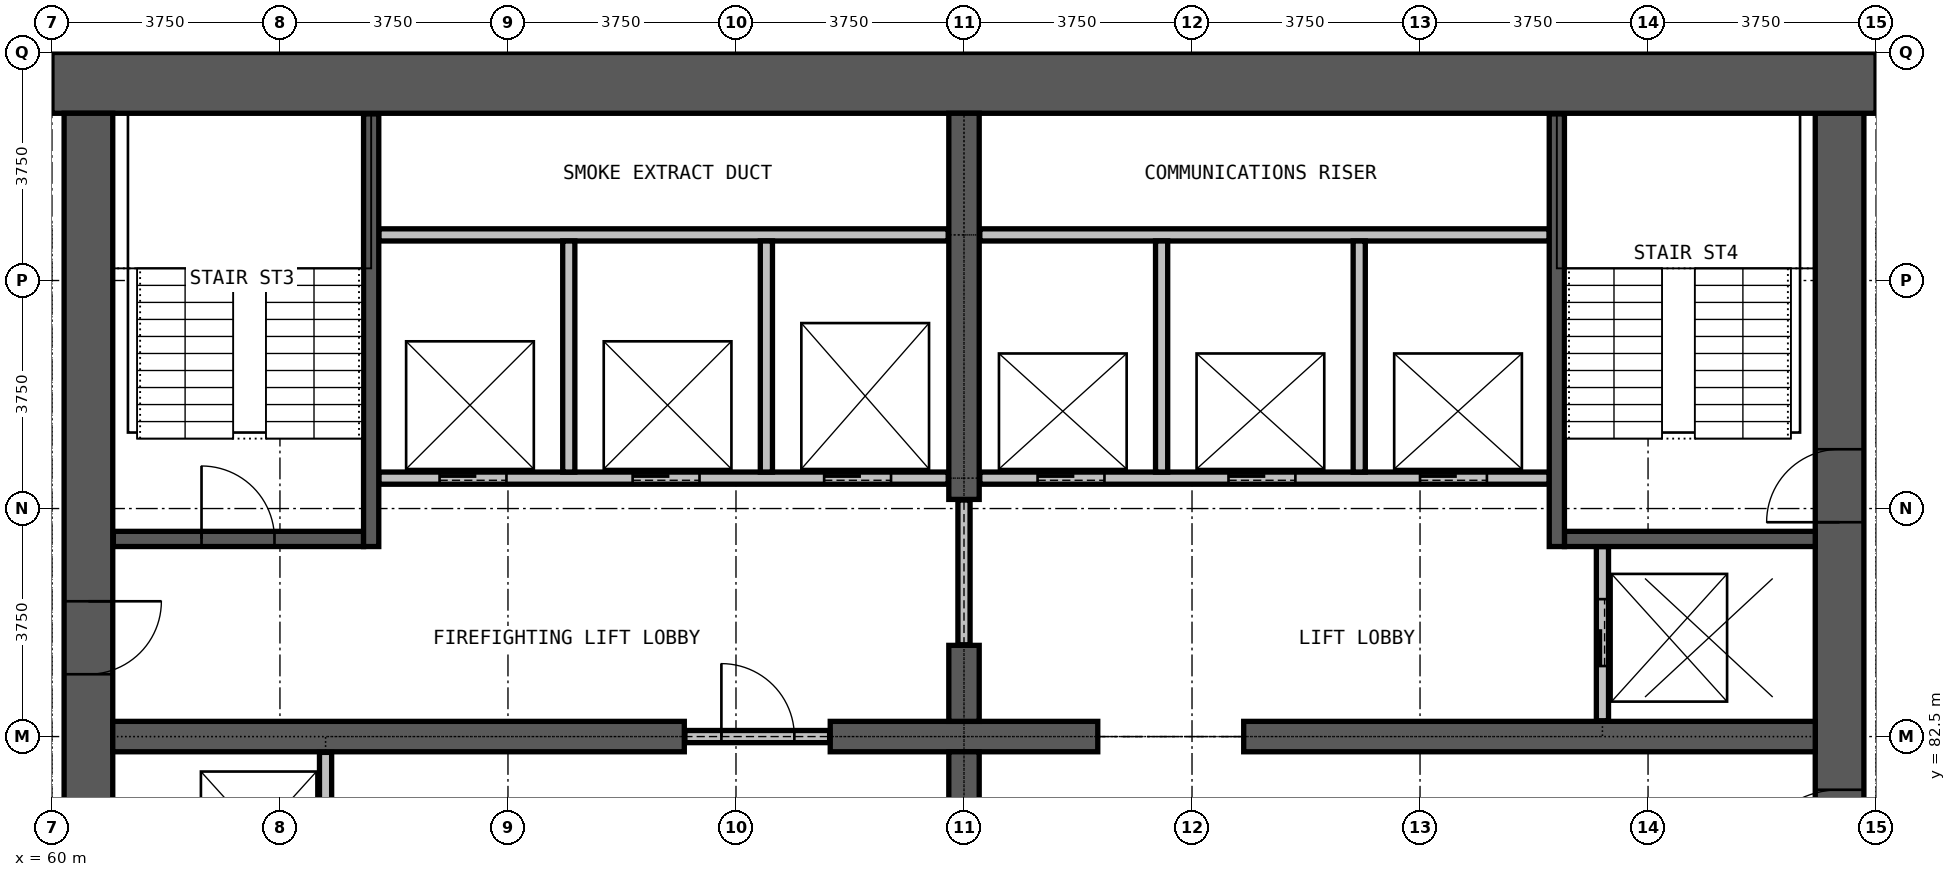
"""IFC4 building model, lengths in metres.
Left out: names, types, materials, properties, quantities, classifications, styles, units other than length and angle.
Written with IfcOpenShell. Run it as: python <this file> out.ifc"""

import sys

from ifc_helpers import new_model, si_unit, direction, frame, frame_2d, origin, place, context, subcontext, project, spatial, rectangle, extrude, element, fill, save


model = new_model("IFC4")
c1 = context("Model", 3, precision=1e-05, world=origin(), true_north=direction((0.0, 1.0)))
c2 = subcontext(c1, "Body", "Model", "MODEL_VIEW")
j1 = project(units=[si_unit("LENGTHUNIT", "METRE"), si_unit("PLANEANGLEUNIT", "RADIAN")], contexts=[c1])
p1 = place(None, origin())
s1 = spatial("IfcSite", under=j1, at=p1, CompositionType="ELEMENT")
p2 = place(p1, origin())
s2 = spatial("IfcBuilding", under=s1, at=p2, CompositionType="ELEMENT")
p3 = place(p2, frame((0.0, 0.0, 151.3)))
s3 = spatial("IfcBuildingStorey", under=s2, at=p3, CompositionType="ELEMENT", Elevation=151.3)
p4 = place(p3, frame((89.4, 72.25, 0.0), z_axis=(0.0, 0.0, 1.0), x_axis=(0.0, 1.0, 0.0)))
e1 = element("IfcWall", 1, at=p4, inside=s3, PredefinedType="SHEAR", context=c2, shape_type="SweptSolid", body=[
    extrude(rectangle(XDim=20.5, YDim=0.8, at=frame_2d((10.25, 0.0))), origin(), (0.0, 0.0, 1.0), 3.6),
])
p5 = place(p4, frame((0.275, 0.0, 0.0)))
e2 = element("IfcOpeningElement", 2, at=p5, cuts=e1, PredefinedType="OPENING", context=c2, shape_type="SweptSolid", body=[
    extrude(rectangle(XDim=1.2, YDim=2.2, at=frame_2d((0.6, 1.1))), frame((0.0, 0.41, 0.0), z_axis=(0.0, -1.0, 0.0), x_axis=(1.0, 0.0, 0.0)), (0.0, 0.0, 1.0), 0.82),
])
p6 = place(p4, frame((13.775, 0.0, 0.0)))
e3 = element("IfcOpeningElement", 3, at=p6, cuts=e1, PredefinedType="OPENING", context=c2, shape_type="SweptSolid", body=[
    extrude(rectangle(XDim=1.2, YDim=2.2, at=frame_2d((0.6, 1.1))), frame((0.0, 0.41, 0.0), z_axis=(0.0, -1.0, 0.0), x_axis=(1.0, 0.0, 0.0)), (0.0, 0.0, 1.0), 0.82),
])
p7 = place(p4, frame((7.875, 0.0, 0.0)))
e4 = element("IfcOpeningElement", 4, at=p7, cuts=e1, PredefinedType="OPENING", context=c2, shape_type="SweptSolid", body=[
    extrude(rectangle(XDim=1.5, YDim=2.2, at=frame_2d((0.75, 1.1))), frame((0.0, 0.41, 0.0), z_axis=(0.0, -1.0, 0.0), x_axis=(1.0, 0.0, 0.0)), (0.0, 0.0, 1.0), 0.82),
])
p8 = place(p3, frame((90.0, 93.25, 0.0), z_axis=(0.0, 0.0, 1.0), x_axis=(-1.0, 0.0, 0.0)))
e5 = element("IfcWall", 5, at=p8, inside=s3, PredefinedType="SHEAR", context=c2, shape_type="SweptSolid", body=[
    extrude(rectangle(XDim=30.0, YDim=1.0, at=frame_2d((15.0, 0.0))), origin(), (0.0, 0.0, 1.0), 3.6),
])
p9 = place(p3, frame((60.6, 92.75, 0.0), z_axis=(0.0, 0.0, 1.0), x_axis=(0.0, -1.0, 0.0)))
e6 = element("IfcWall", 6, at=p9, inside=s3, PredefinedType="SHEAR", context=c2, shape_type="SweptSolid", body=[
    extrude(rectangle(XDim=20.5, YDim=0.8, at=frame_2d((10.25, 0.0))), origin(), (0.0, 0.0, 1.0), 3.6),
])
p10 = place(p9, frame((19.025, 0.0, 0.0)))
e7 = element("IfcOpeningElement", 7, at=p10, cuts=e6, PredefinedType="OPENING", context=c2, shape_type="SweptSolid", body=[
    extrude(rectangle(XDim=1.2, YDim=2.2, at=frame_2d((0.6, 1.1))), frame((0.0, 0.41, 0.0), z_axis=(0.0, -1.0, 0.0), x_axis=(1.0, 0.0, 0.0)), (0.0, 0.0, 1.0), 0.82),
])
p11 = place(p9, frame((8.025, 0.0, 0.0)))
e8 = element("IfcOpeningElement", 8, at=p11, cuts=e6, PredefinedType="OPENING", context=c2, shape_type="SweptSolid", body=[
    extrude(rectangle(XDim=1.2, YDim=2.2, at=frame_2d((0.6, 1.1))), frame((0.0, 0.41, 0.0), z_axis=(0.0, -1.0, 0.0), x_axis=(1.0, 0.0, 0.0)), (0.0, 0.0, 1.0), 0.82),
])
p12 = place(p3, frame((61.0, 82.5, 0.0), z_axis=(0.0, 0.0, 1.0), x_axis=(1.0, 0.0, 0.0)))
e9 = element("IfcWall", 9, at=p12, inside=s3, PredefinedType="SHEAR", context=c2, shape_type="SweptSolid", body=[
    extrude(rectangle(XDim=9.4, YDim=0.5, at=frame_2d((4.7, 0.0))), origin(), (0.0, 0.0, 1.0), 3.6),
])
p13 = place(p3, frame((72.8, 82.5, 0.0), z_axis=(0.0, 0.0, 1.0), x_axis=(1.0, 0.0, 0.0)))
e10 = element("IfcWall", 10, at=p13, inside=s3, PredefinedType="SHEAR", context=c2, shape_type="SweptSolid", body=[
    extrude(rectangle(XDim=4.4, YDim=0.5, at=frame_2d((2.2, 0.0))), origin(), (0.0, 0.0, 1.0), 3.6),
])
p14 = place(p3, frame((79.6, 82.5, 0.0), z_axis=(0.0, 0.0, 1.0), x_axis=(1.0, 0.0, 0.0)))
e11 = element("IfcWall", 11, at=p14, inside=s3, PredefinedType="SHEAR", context=c2, shape_type="SweptSolid", body=[
    extrude(rectangle(XDim=9.4, YDim=0.5, at=frame_2d((4.7, 0.0))), origin(), (0.0, 0.0, 1.0), 3.6),
])
for number, where, z_axis, x_axis in (
    (12, (75.0, 81.0, 0.0), (0.0, 0.0, 1.0), (0.0, 1.0, 0.0)),
    (13, (75.0, 82.75, 0.0), (0.0, 0.0, 1.0), (0.0, 1.0, 0.0)),
):
    element("IfcWall", number, at=place(p3, frame(where, z_axis=z_axis, x_axis=x_axis)), inside=s3, PredefinedType="SHEAR", context=c2, shape_type="SweptSolid", body=[
        extrude(rectangle(XDim=1.25, YDim=0.5, at=frame_2d((0.625, 0.0))), origin(), (0.0, 0.0, 1.0), 3.6),
    ])
p15 = place(p3, frame((75.0, 86.4, 0.0), z_axis=(0.0, 0.0, 1.0), x_axis=(0.0, 1.0, 0.0)))
e14 = element("IfcWall", 14, at=p15, inside=s3, PredefinedType="SHEAR", context=c2, shape_type="SweptSolid", body=[
    extrude(rectangle(XDim=6.35, YDim=0.5, at=frame_2d((3.175, 0.0))), origin(), (0.0, 0.0, 1.0), 3.6),
])
p16 = place(p3, frame((70.41, 82.5, 0.0), z_axis=(0.0, 0.0, 1.0), x_axis=(1.0, 0.0, 0.0)))
e15 = element("IfcWall", 15, at=p16, inside=s3, PredefinedType="PARTITIONING", context=c2, shape_type="SweptSolid", body=[
    extrude(rectangle(XDim=2.38, YDim=0.2, at=frame_2d((1.19, 0.0))), origin(), (0.0, 0.0, 1.0), 2.4),
])
p17 = place(p16, frame((0.6, 0.0, 0.0)))
e16 = element("IfcOpeningElement", 16, at=p17, cuts=e15, PredefinedType="OPENING", context=c2, shape_type="SweptSolid", body=[
    extrude(rectangle(XDim=1.2, YDim=2.2, at=frame_2d((0.6, 1.1))), frame((0.0, 0.11, 0.0), z_axis=(0.0, -1.0, 0.0), x_axis=(1.0, 0.0, 0.0)), (0.0, 0.0, 1.0), 0.22),
])
p18 = place(p3, frame((75.0, 84.01, 0.0), z_axis=(0.0, 0.0, 1.0), x_axis=(0.0, 1.0, 0.0)))
e17 = element("IfcWall", 17, at=p18, inside=s3, PredefinedType="PARTITIONING", context=c2, shape_type="SweptSolid", body=[
    extrude(rectangle(XDim=2.38, YDim=0.2, at=frame_2d((1.19, 0.0))), origin(), (0.0, 0.0, 1.0), 2.4),
])
p19 = place(p3, frame((65.375, 86.75, 0.0), z_axis=(0.0, 0.0, 1.0), x_axis=(1.0, 0.0, 0.0)))
e18 = element("IfcWall", 18, at=p19, inside=s3, PredefinedType="PARTITIONING", context=c2, shape_type="SweptSolid", body=[
    extrude(rectangle(XDim=9.365, YDim=0.2, at=frame_2d((4.683, 0.0))), origin(), (0.0, 0.0, 1.0), 3.3),
])
p20 = place(p19, frame((1.0, 0.0, 0.0)))
e19 = element("IfcOpeningElement", 19, at=p20, cuts=e18, PredefinedType="OPENING", context=c2, shape_type="SweptSolid", body=[
    extrude(rectangle(XDim=1.1, YDim=2.2, at=frame_2d((0.55, 1.1))), frame((0.0, 0.11, 0.0), z_axis=(0.0, -1.0, 0.0), x_axis=(1.0, 0.0, 0.0)), (0.0, 0.0, 1.0), 0.22),
])
p21 = place(p19, frame((4.175, 0.0, 0.0)))
e20 = element("IfcOpeningElement", 20, at=p21, cuts=e18, PredefinedType="OPENING", context=c2, shape_type="SweptSolid", body=[
    extrude(rectangle(XDim=1.1, YDim=2.2, at=frame_2d((0.55, 1.1))), frame((0.0, 0.11, 0.0), z_axis=(0.0, -1.0, 0.0), x_axis=(1.0, 0.0, 0.0)), (0.0, 0.0, 1.0), 0.22),
])
p22 = place(p19, frame((7.325, 0.0, 0.0)))
e21 = element("IfcOpeningElement", 21, at=p22, cuts=e18, PredefinedType="OPENING", context=c2, shape_type="SweptSolid", body=[
    extrude(rectangle(XDim=1.1, YDim=2.2, at=frame_2d((0.55, 1.1))), frame((0.0, 0.11, 0.0), z_axis=(0.0, -1.0, 0.0), x_axis=(1.0, 0.0, 0.0)), (0.0, 0.0, 1.0), 0.22),
])
p23 = place(p3, frame((75.26, 86.75, 0.0), z_axis=(0.0, 0.0, 1.0), x_axis=(1.0, 0.0, 0.0)))
e22 = element("IfcWall", 22, at=p23, inside=s3, PredefinedType="PARTITIONING", context=c2, shape_type="SweptSolid", body=[
    extrude(rectangle(XDim=9.365, YDim=0.2, at=frame_2d((4.683, 0.0))), origin(), (0.0, 0.0, 1.0), 3.3),
])
p24 = place(p23, frame((0.95, 0.0, 0.0)))
e23 = element("IfcOpeningElement", 23, at=p24, cuts=e22, PredefinedType="OPENING", context=c2, shape_type="SweptSolid", body=[
    extrude(rectangle(XDim=1.1, YDim=2.2, at=frame_2d((0.55, 1.1))), frame((0.0, 0.11, 0.0), z_axis=(0.0, -1.0, 0.0), x_axis=(1.0, 0.0, 0.0)), (0.0, 0.0, 1.0), 0.22),
])
p25 = place(p23, frame((4.09, 0.0, 0.0)))
e24 = element("IfcOpeningElement", 24, at=p25, cuts=e22, PredefinedType="OPENING", context=c2, shape_type="SweptSolid", body=[
    extrude(rectangle(XDim=1.1, YDim=2.2, at=frame_2d((0.55, 1.1))), frame((0.0, 0.11, 0.0), z_axis=(0.0, -1.0, 0.0), x_axis=(1.0, 0.0, 0.0)), (0.0, 0.0, 1.0), 0.22),
])
p26 = place(p23, frame((7.24, 0.0, 0.0)))
e25 = element("IfcOpeningElement", 25, at=p26, cuts=e22, PredefinedType="OPENING", context=c2, shape_type="SweptSolid", body=[
    extrude(rectangle(XDim=1.1, YDim=2.2, at=frame_2d((0.55, 1.1))), frame((0.0, 0.11, 0.0), z_axis=(0.0, -1.0, 0.0), x_axis=(1.0, 0.0, 0.0)), (0.0, 0.0, 1.0), 0.22),
])
for number, where, z_axis, x_axis in (
    (26, (65.375, 90.75, 0.0), (0.0, 0.0, 1.0), (1.0, 0.0, 0.0)),
    (27, (75.26, 90.75, 0.0), (0.0, 0.0, 1.0), (1.0, 0.0, 0.0)),
):
    element("IfcWall", number, at=place(p3, frame(where, z_axis=z_axis, x_axis=x_axis)), inside=s3, PredefinedType="PARTITIONING", context=c2, shape_type="SweptSolid", body=[
        extrude(rectangle(XDim=9.365, YDim=0.2, at=frame_2d((4.683, 0.0))), origin(), (0.0, 0.0, 1.0), 3.3),
    ])
p27 = place(p3, frame((64.5, 79.375, 0.0), z_axis=(0.0, 0.0, 1.0), x_axis=(0.0, 1.0, 0.0)))
e28 = element("IfcWall", 28, at=p27, inside=s3, PredefinedType="PARTITIONING", context=c2, shape_type="SweptSolid", body=[
    extrude(rectangle(XDim=2.865, YDim=0.2, at=frame_2d((1.433, 0.0))), origin(), (0.0, 0.0, 1.0), 3.3),
])
for number, where, z_axis, x_axis in (
    (29, (68.5, 86.85, 0.0), (0.0, 0.0, 1.0), (0.0, 1.0, 0.0)),
    (30, (71.75, 86.85, 0.0), (0.0, 0.0, 1.0), (0.0, 1.0, 0.0)),
    (31, (78.25, 86.85, 0.0), (0.0, 0.0, 1.0), (0.0, 1.0, 0.0)),
    (32, (81.5, 86.85, 0.0), (0.0, 0.0, 1.0), (0.0, 1.0, 0.0)),
):
    element("IfcWall", number, at=place(p3, frame(where, z_axis=z_axis, x_axis=x_axis)), inside=s3, PredefinedType="PARTITIONING", context=c2, shape_type="SweptSolid", body=[
        extrude(rectangle(XDim=3.8, YDim=0.2, at=frame_2d((1.9, 0.0))), origin(), (0.0, 0.0, 1.0), 3.3),
    ])
p28 = place(p3, frame((85.5, 82.76, 0.0), z_axis=(0.0, 0.0, 1.0), x_axis=(0.0, 1.0, 0.0)))
e33 = element("IfcWall", 33, at=p28, inside=s3, PredefinedType="PARTITIONING", context=c2, shape_type="SweptSolid", body=[
    extrude(rectangle(XDim=2.865, YDim=0.2, at=frame_2d((1.433, 0.0))), origin(), (0.0, 0.0, 1.0), 3.3),
])
p29 = place(p28, frame((0.9, 0.0, 0.0)))
e34 = element("IfcOpeningElement", 34, at=p29, cuts=e33, PredefinedType="OPENING", context=c2, shape_type="SweptSolid", body=[
    extrude(rectangle(XDim=1.1, YDim=2.2, at=frame_2d((0.55, 1.1))), frame((0.0, 0.11, 0.0), z_axis=(0.0, -1.0, 0.0), x_axis=(1.0, 0.0, 0.0)), (0.0, 0.0, 1.0), 0.22),
])
p30 = place(p3, frame((61.01, 85.75, 0.0), z_axis=(0.0, 0.0, 1.0), x_axis=(1.0, 0.0, 0.0)))
e35 = element("IfcWall", 35, at=p30, inside=s3, PredefinedType="PARTITIONING", context=c2, shape_type="SweptSolid", body=[
    extrude(rectangle(XDim=4.115, YDim=0.25, at=frame_2d((2.058, 0.0))), origin(), (0.0, 0.0, 1.0), 3.3),
])
p31 = place(p30, frame((1.45, 0.0, 0.0)))
e36 = element("IfcOpeningElement", 36, at=p31, cuts=e35, PredefinedType="OPENING", context=c2, shape_type="SweptSolid", body=[
    extrude(rectangle(XDim=1.2, YDim=2.2, at=frame_2d((0.6, 1.1))), frame((0.0, 0.135, 0.0), z_axis=(0.0, -1.0, 0.0), x_axis=(1.0, 0.0, 0.0)), (0.0, 0.0, 1.0), 0.27),
])
p32 = place(p3, frame((84.875, 85.75, 0.0), z_axis=(0.0, 0.0, 1.0), x_axis=(1.0, 0.0, 0.0)))
e37 = element("IfcWall", 37, at=p32, inside=s3, PredefinedType="PARTITIONING", context=c2, shape_type="SweptSolid", body=[
    extrude(rectangle(XDim=4.125, YDim=0.25, at=frame_2d((2.062, 0.0))), origin(), (0.0, 0.0, 1.0), 3.3),
])
for number, where, z_axis, x_axis in (
    (38, (65.25, 85.625, 0.0), (0.0, 0.0, 1.0), (0.0, 1.0, 0.0)),
    (39, (84.75, 85.625, 0.0), (0.0, 0.0, 1.0), (0.0, 1.0, 0.0)),
):
    element("IfcWall", number, at=place(p3, frame(where, z_axis=z_axis, x_axis=x_axis)), inside=s3, PredefinedType="PARTITIONING", context=c2, shape_type="SweptSolid", body=[
        extrude(rectangle(XDim=7.115, YDim=0.25, at=frame_2d((3.558, 0.0))), origin(), (0.0, 0.0, 1.0), 3.3),
    ])
p33 = place(p24, origin())
e40 = element("IfcDoor", 40, at=p33, inside=s3, OperationType="DOUBLE_DOOR_SLIDING", PredefinedType="DOOR", context=c2, shape_type="SweptSolid", body=[
    extrude(rectangle(XDim=1.1, YDim=2.2, at=frame_2d((0.55, 1.1))), frame((0.0, 0.025, 0.0), z_axis=(0.0, -1.0, 0.0), x_axis=(1.0, 0.0, 0.0)), (0.0, 0.0, 1.0), 0.05),
])
fill(e23, e40)
p34 = place(p25, origin())
e41 = element("IfcDoor", 41, at=p34, inside=s3, OperationType="DOUBLE_DOOR_SLIDING", PredefinedType="DOOR", context=c2, shape_type="SweptSolid", body=[
    extrude(rectangle(XDim=1.1, YDim=2.2, at=frame_2d((0.55, 1.1))), frame((0.0, 0.025, 0.0), z_axis=(0.0, -1.0, 0.0), x_axis=(1.0, 0.0, 0.0)), (0.0, 0.0, 1.0), 0.05),
])
fill(e24, e41)
p35 = place(p26, origin())
e42 = element("IfcDoor", 42, at=p35, inside=s3, OperationType="DOUBLE_DOOR_SLIDING", PredefinedType="DOOR", context=c2, shape_type="SweptSolid", body=[
    extrude(rectangle(XDim=1.1, YDim=2.2, at=frame_2d((0.55, 1.1))), frame((0.0, 0.025, 0.0), z_axis=(0.0, -1.0, 0.0), x_axis=(1.0, 0.0, 0.0)), (0.0, 0.0, 1.0), 0.05),
])
fill(e25, e42)
p36 = place(p20, origin())
e43 = element("IfcDoor", 43, at=p36, inside=s3, OperationType="DOUBLE_DOOR_SLIDING", PredefinedType="DOOR", context=c2, shape_type="SweptSolid", body=[
    extrude(rectangle(XDim=1.1, YDim=2.2, at=frame_2d((0.55, 1.1))), frame((0.0, 0.025, 0.0), z_axis=(0.0, -1.0, 0.0), x_axis=(1.0, 0.0, 0.0)), (0.0, 0.0, 1.0), 0.05),
])
fill(e19, e43)
p37 = place(p21, origin())
e44 = element("IfcDoor", 44, at=p37, inside=s3, OperationType="DOUBLE_DOOR_SLIDING", PredefinedType="DOOR", context=c2, shape_type="SweptSolid", body=[
    extrude(rectangle(XDim=1.1, YDim=2.2, at=frame_2d((0.55, 1.1))), frame((0.0, 0.025, 0.0), z_axis=(0.0, -1.0, 0.0), x_axis=(1.0, 0.0, 0.0)), (0.0, 0.0, 1.0), 0.05),
])
fill(e20, e44)
p38 = place(p22, origin())
e45 = element("IfcDoor", 45, at=p38, inside=s3, OperationType="DOUBLE_DOOR_SLIDING", PredefinedType="DOOR", context=c2, shape_type="SweptSolid", body=[
    extrude(rectangle(XDim=1.1, YDim=2.2, at=frame_2d((0.55, 1.1))), frame((0.0, 0.025, 0.0), z_axis=(0.0, -1.0, 0.0), x_axis=(1.0, 0.0, 0.0)), (0.0, 0.0, 1.0), 0.05),
])
fill(e21, e45)
p39 = place(p29, origin())
e46 = element("IfcDoor", 46, at=p39, inside=s3, OperationType="DOUBLE_DOOR_SLIDING", PredefinedType="DOOR", context=c2, shape_type="SweptSolid", body=[
    extrude(rectangle(XDim=1.1, YDim=2.2, at=frame_2d((0.55, 1.1))), frame((0.0, 0.025, 0.0), z_axis=(0.0, -1.0, 0.0), x_axis=(1.0, 0.0, 0.0)), (0.0, 0.0, 1.0), 0.05),
])
fill(e34, e46)
p40 = place(p17, origin())
e47 = element("IfcDoor", 47, at=p40, inside=s3, OperationType="SINGLE_SWING_RIGHT", PredefinedType="DOOR", context=c2, shape_type="SweptSolid", body=[
    extrude(rectangle(XDim=1.2, YDim=2.2, at=frame_2d((0.6, 1.1))), frame((0.0, 0.025, 0.0), z_axis=(0.0, -1.0, 0.0), x_axis=(1.0, 0.0, 0.0)), (0.0, 0.0, 1.0), 0.05),
])
fill(e16, e47)
p41 = place(p31, origin())
e48 = element("IfcDoor", 48, at=p41, inside=s3, OperationType="SINGLE_SWING_LEFT", PredefinedType="DOOR", context=c2, shape_type="SweptSolid", body=[
    extrude(rectangle(XDim=1.2, YDim=2.2, at=frame_2d((0.6, 1.1))), frame((0.0, 0.025, 0.0), z_axis=(0.0, -1.0, 0.0), x_axis=(1.0, 0.0, 0.0)), (0.0, 0.0, 1.0), 0.05),
])
fill(e36, e48)
p42 = place(p6, origin())
e49 = element("IfcDoor", 49, at=p42, inside=s3, OperationType="SINGLE_SWING_RIGHT", PredefinedType="DOOR", context=c2, shape_type="SweptSolid", body=[
    extrude(rectangle(XDim=1.2, YDim=2.2, at=frame_2d((0.6, 1.1))), frame((0.0, 0.025, 0.0), z_axis=(0.0, -1.0, 0.0), x_axis=(1.0, 0.0, 0.0)), (0.0, 0.0, 1.0), 0.05),
])
fill(e3, e49)
p43 = place(p7, origin())
e50 = element("IfcDoor", 50, at=p43, inside=s3, OperationType="DOUBLE_DOOR_SINGLE_SWING", PredefinedType="DOOR", context=c2, shape_type="SweptSolid", body=[
    extrude(rectangle(XDim=1.5, YDim=2.2, at=frame_2d((0.75, 1.1))), frame((0.0, 0.025, 0.0), z_axis=(0.0, -1.0, 0.0), x_axis=(1.0, 0.0, 0.0)), (0.0, 0.0, 1.0), 0.05),
])
fill(e4, e50)
p44 = place(p11, origin())
e51 = element("IfcDoor", 51, at=p44, inside=s3, OperationType="SINGLE_SWING_RIGHT", PredefinedType="DOOR", context=c2, shape_type="SweptSolid", body=[
    extrude(rectangle(XDim=1.2, YDim=2.2, at=frame_2d((0.6, 1.1))), frame((0.0, 0.025, 0.0), z_axis=(0.0, -1.0, 0.0), x_axis=(1.0, 0.0, 0.0)), (0.0, 0.0, 1.0), 0.05),
])
fill(e8, e51)
save(model, sys.argv[1])
